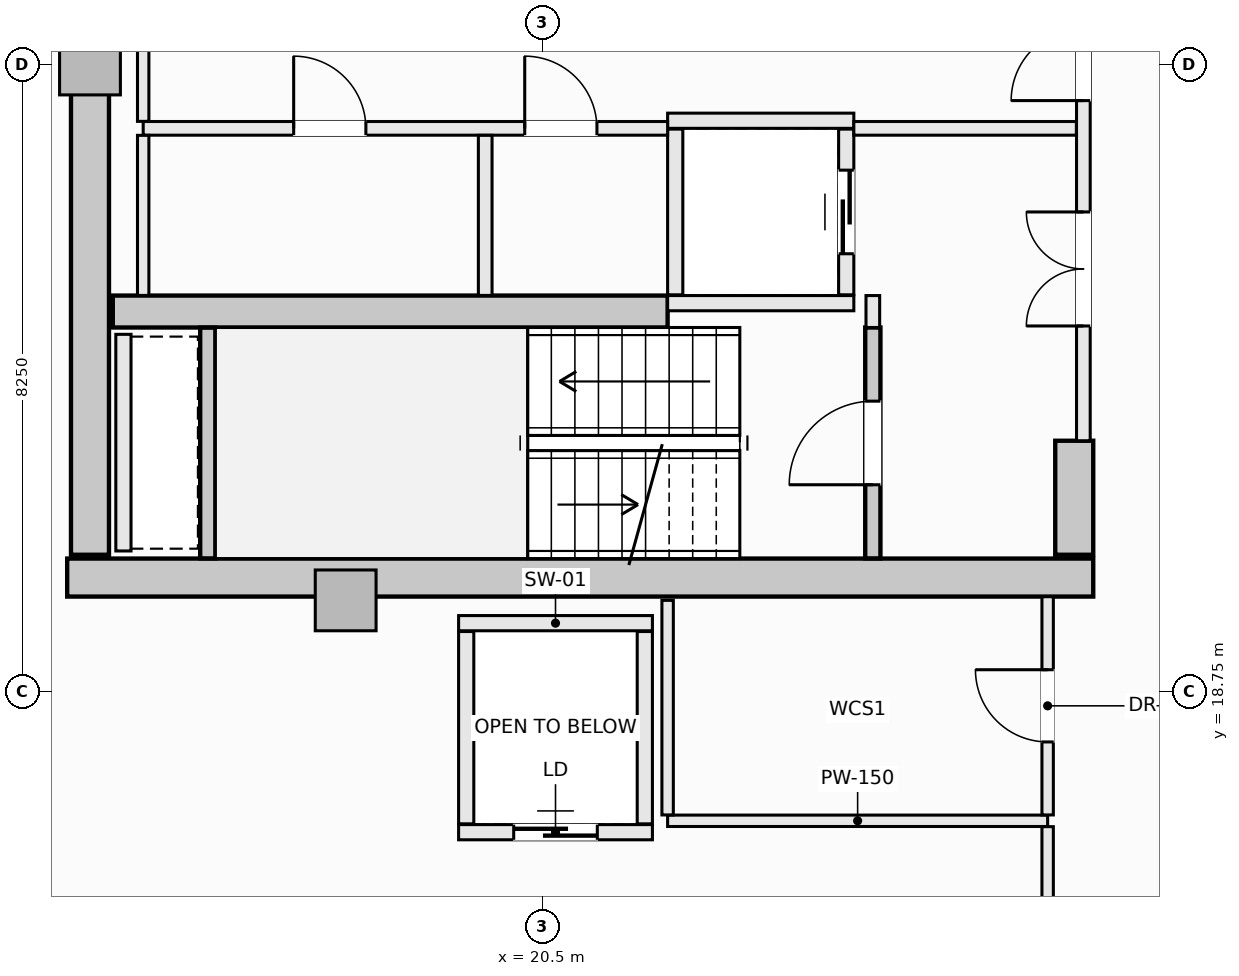
"""IFC4 building model, lengths in metres.
Left out: names, types, materials, properties, quantities, classifications, styles, units other than length and angle.
Written with IfcOpenShell. Run it as: python <this file> out.ifc"""

import sys

from ifc_helpers import new_model, si_unit, direction, frame, frame_2d, origin, origin_2d, place, context, subcontext, project, spatial, rectangle, extrude, element, fill, save


model = new_model("IFC4")
c1 = context("Model", 3, precision=1e-05, world=origin(), true_north=direction((0.0, 1.0)))
c2 = subcontext(c1, "Body", "Model", "MODEL_VIEW")
j1 = project(units=[si_unit("LENGTHUNIT", "METRE"), si_unit("PLANEANGLEUNIT", "RADIAN")], contexts=[c1])
p1 = place(None, origin())
s1 = spatial("IfcSite", under=j1, at=p1, CompositionType="ELEMENT")
p2 = place(p1, origin())
s2 = spatial("IfcBuilding", under=s1, at=p2, CompositionType="ELEMENT")
p3 = place(p2, frame((0.0, 0.0, 196.4)))
s3 = spatial("IfcBuildingStorey", under=s2, at=p3, CompositionType="ELEMENT", Elevation=196.4)
p4 = place(p3, frame((14.25, 20.25, -0.27), z_axis=(0.0, 0.0, 1.0), x_axis=(1.0, 0.0, 0.0)))
e1 = element("IfcWall", 1, at=p4, inside=s3, PredefinedType="SHEAR", context=c2, shape_type="SweptSolid", body=[
    extrude(rectangle(XDim=13.5, YDim=0.5, at=frame_2d((6.75, 0.0))), origin(), (0.0, 0.0, 1.0), 3.3),
])
p5 = place(p3, frame((14.55, 20.55, -0.27), z_axis=(0.0, 0.0, 1.0), x_axis=(0.0, 1.0, 0.0)))
e2 = element("IfcWall", 2, at=p5, inside=s3, PredefinedType="SHEAR", context=c2, shape_type="SweptSolid", body=[
    extrude(rectangle(XDim=12.9, YDim=0.5, at=frame_2d((6.45, 0.0))), origin(), (0.0, 0.0, 1.0), 3.3),
])
p6 = place(p3, frame((27.5, 20.55, -0.27), z_axis=(0.0, 0.0, 1.0), x_axis=(0.0, 1.0, 0.0)))
e3 = element("IfcWall", 3, at=p6, inside=s3, PredefinedType="SHEAR", context=c2, shape_type="SweptSolid", body=[
    extrude(rectangle(XDim=1.5, YDim=0.5, at=frame_2d((0.75, 0.0))), origin(), (0.0, 0.0, 1.0), 3.3),
])
p7 = place(p3, frame((14.85, 23.75, -0.27), z_axis=(0.0, 0.0, 1.0), x_axis=(1.0, 0.0, 0.0)))
e4 = element("IfcWall", 4, at=p7, inside=s3, PredefinedType="SHEAR", context=c2, shape_type="SweptSolid", body=[
    extrude(rectangle(XDim=7.3, YDim=0.42, at=frame_2d((3.65, 0.0))), origin(), (0.0, 0.0, 1.0), 3.3),
])
for number, where, z_axis, x_axis in (
    (5, (14.55, 27.0, -0.27), (0.0, 0.0, 1.0), (1.0, 0.0, 0.0)),
    (6, (17.914, 19.95, -0.27), (0.0, 0.0, 1.0), (1.0, 0.0, 0.0)),
):
    element("IfcColumn", number, at=place(p3, frame(where, z_axis=z_axis, x_axis=x_axis)), inside=s3, PredefinedType="PILASTER", context=c2, shape_type="SweptSolid", body=[
        extrude(rectangle(XDim=0.8, YDim=0.8, at=origin_2d()), origin(), (0.0, 0.0, 1.0), 3.3),
    ])
p8 = place(p3, frame((8.691, 17.1, 0.0), z_axis=(0.0, 0.0, 1.0), x_axis=(0.901348331142, -0.433094892545, 0.0)))
e7 = element("IfcWall", 7, at=p8, inside=s3, PredefinedType="SOLIDWALL", context=c2, shape_type="SweptSolid", body=[
    extrude(rectangle(XDim=6.021, YDim=0.3, at=frame_2d((3.01, 0.0))), origin(), (0.0, 0.0, 1.0), 2.605),
])
p9 = place(p8, frame((1.65, 0.0, 0.72)))
e8 = element("IfcOpeningElement", 8, at=p9, cuts=e7, PredefinedType="OPENING", context=c2, shape_type="SweptSolid", body=[
    extrude(rectangle(XDim=2.2, YDim=1.65, at=frame_2d((1.1, 0.825))), frame((0.0, 0.16, 0.0), z_axis=(0.0, -1.0, 0.0), x_axis=(1.0, 0.0, 0.0)), (0.0, 0.0, 1.0), 0.32),
])
p10 = place(p3, frame((24.85, 20.502, -0.27), z_axis=(0.0, 0.0, 1.0), x_axis=(0.0, 1.0, 0.0)))
e9 = element("IfcWall", 9, at=p10, inside=s3, PredefinedType="SHEAR", context=c2, shape_type="SweptSolid", body=[
    extrude(rectangle(XDim=3.038, YDim=0.2, at=frame_2d((1.519, 0.0))), origin(), (0.0, 0.0, 1.0), 3.3),
])
p11 = place(p10, frame((0.969, 0.0, 0.27)))
e10 = element("IfcOpeningElement", 10, at=p11, cuts=e9, PredefinedType="OPENING", context=c2, shape_type="SweptSolid", body=[
    extrude(rectangle(XDim=1.1, YDim=2.15, at=frame_2d((0.55, 1.075))), frame((0.0, 0.11, 0.0), z_axis=(0.0, -1.0, 0.0), x_axis=(1.0, 0.0, 0.0)), (0.0, 0.0, 1.0), 0.22),
])
p12 = place(p3, frame((16.1, 20.502, -0.27), z_axis=(0.0, 0.0, 1.0), x_axis=(0.0, 1.0, 0.0)))
e11 = element("IfcWall", 11, at=p12, inside=s3, PredefinedType="SHEAR", context=c2, shape_type="SweptSolid", body=[
    extrude(rectangle(XDim=3.036, YDim=0.2, at=frame_2d((1.518, 0.0))), origin(), (0.0, 0.0, 1.0), 3.3),
])
for number, where, z_axis, x_axis in (
    (12, (22.15, 26.26, 0.0), (0.0, 0.0, 1.0), (1.0, 0.0, 0.0)),
    (13, (22.15, 23.86, 0.0), (0.0, 0.0, 1.0), (1.0, 0.0, 0.0)),
):
    element("IfcWall", number, at=place(p3, frame(where, z_axis=z_axis, x_axis=x_axis)), inside=s3, PredefinedType="SOLIDWALL", context=c2, shape_type="SweptSolid", body=[
        extrude(rectangle(XDim=2.45, YDim=0.2, at=frame_2d((1.225, 0.0))), origin(), (0.0, 0.0, 1.0), 3.03),
    ])
p13 = place(p3, frame((22.25, 23.97, 0.0), z_axis=(0.0, 0.0, 1.0), x_axis=(0.0, 1.0, 0.0)))
e14 = element("IfcWall", 14, at=p13, inside=s3, PredefinedType="SOLIDWALL", context=c2, shape_type="SweptSolid", body=[
    extrude(rectangle(XDim=2.18, YDim=0.2, at=frame_2d((1.09, 0.0))), origin(), (0.0, 0.0, 1.0), 3.03),
])
p14 = place(p3, frame((24.5, 23.97, 0.0), z_axis=(0.0, 0.0, 1.0), x_axis=(0.0, 1.0, 0.0)))
e15 = element("IfcWall", 15, at=p14, inside=s3, PredefinedType="SOLIDWALL", context=c2, shape_type="SweptSolid", body=[
    extrude(rectangle(XDim=2.18, YDim=0.2, at=frame_2d((1.09, 0.0))), origin(), (0.0, 0.0, 1.0), 3.03),
])
p15 = place(p14, frame((0.54, 0.0, 0.0)))
e16 = element("IfcOpeningElement", 16, at=p15, cuts=e15, PredefinedType="OPENING", context=c2, shape_type="SweptSolid", body=[
    extrude(rectangle(XDim=1.1, YDim=2.2, at=frame_2d((0.55, 1.1))), frame((0.0, 0.11, 0.0), z_axis=(0.0, -1.0, 0.0), x_axis=(1.0, 0.0, 0.0)), (0.0, 0.0, 1.0), 0.22),
])
p16 = place(p3, frame((19.4, 19.65, 0.0), z_axis=(0.0, 0.0, 1.0), x_axis=(1.0, 0.0, 0.0)))
e17 = element("IfcWall", 17, at=p16, inside=s3, PredefinedType="SOLIDWALL", context=c2, shape_type="SweptSolid", body=[
    extrude(rectangle(XDim=2.55, YDim=0.2, at=frame_2d((1.275, 0.0))), origin(), (0.0, 0.0, 1.0), 3.03),
])
p17 = place(p3, frame((19.4, 16.9, 0.0), z_axis=(0.0, 0.0, 1.0), x_axis=(1.0, 0.0, 0.0)))
e18 = element("IfcWall", 18, at=p17, inside=s3, PredefinedType="SOLIDWALL", context=c2, shape_type="SweptSolid", body=[
    extrude(rectangle(XDim=2.55, YDim=0.2, at=frame_2d((1.275, 0.0))), origin(), (0.0, 0.0, 1.0), 3.03),
])
p18 = place(p17, frame((0.725, 0.0, 0.0)))
e19 = element("IfcOpeningElement", 19, at=p18, cuts=e18, PredefinedType="OPENING", context=c2, shape_type="SweptSolid", body=[
    extrude(rectangle(XDim=1.1, YDim=2.2, at=frame_2d((0.55, 1.1))), frame((0.0, 0.11, 0.0), z_axis=(0.0, -1.0, 0.0), x_axis=(1.0, 0.0, 0.0)), (0.0, 0.0, 1.0), 0.22),
])
for number, where, z_axis, x_axis in (
    (20, (19.5, 17.01, 0.0), (0.0, 0.0, 1.0), (0.0, 1.0, 0.0)),
    (21, (21.85, 17.01, 0.0), (0.0, 0.0, 1.0), (0.0, 1.0, 0.0)),
):
    element("IfcWall", number, at=place(p3, frame(where, z_axis=z_axis, x_axis=x_axis)), inside=s3, PredefinedType="SOLIDWALL", context=c2, shape_type="SweptSolid", body=[
        extrude(rectangle(XDim=2.53, YDim=0.2, at=frame_2d((1.265, 0.0))), origin(), (0.0, 0.0, 1.0), 3.03),
    ])
p19 = place(p3, frame((14.99, 20.6, 0.0), z_axis=(0.0, 0.0, 1.0), x_axis=(0.0, 1.0, 0.0)))
e22 = element("IfcWall", 22, at=p19, inside=s3, PredefinedType="SOLIDWALL", context=c2, shape_type="SweptSolid", body=[
    extrude(rectangle(XDim=2.85, YDim=0.2, at=frame_2d((1.425, 0.0))), origin(), (0.0, 0.0, 1.0), 3.03),
])
p20 = place(p3, frame((24.85, 23.54, 0.0), z_axis=(0.0, 0.0, 1.0), x_axis=(0.0, 1.0, 0.0)))
e23 = element("IfcWall", 23, at=p20, inside=s3, PredefinedType="SOLIDWALL", context=c2, shape_type="SweptSolid", body=[
    extrude(rectangle(XDim=0.42, YDim=0.18, at=frame_2d((0.21, 0.0))), origin(), (0.0, 0.0, 1.0), 3.03),
])
p21 = place(p3, frame((27.62, 22.05, 0.0), z_axis=(0.0, 0.0, 1.0), x_axis=(0.0, 1.0, 0.0)))
e24 = element("IfcWall", 24, at=p21, inside=s3, PredefinedType="SOLIDWALL", context=c2, shape_type="SweptSolid", body=[
    extrude(rectangle(XDim=9.9, YDim=0.18, at=frame_2d((4.95, 0.0))), origin(), (0.0, 0.0, 1.0), 3.03),
])
p22 = place(p21, frame((4.475, 0.0, 0.0)))
e25 = element("IfcOpeningElement", 25, at=p22, cuts=e24, PredefinedType="OPENING", context=c2, shape_type="SweptSolid", body=[
    extrude(rectangle(XDim=0.95, YDim=2.1, at=frame_2d((0.475, 1.05))), frame((0.0, 0.1, 0.0), z_axis=(0.0, -1.0, 0.0), x_axis=(1.0, 0.0, 0.0)), (0.0, 0.0, 1.0), 0.2),
])
p23 = place(p21, frame((6.89, 0.0, 0.0)))
e26 = element("IfcOpeningElement", 26, at=p23, cuts=e24, PredefinedType="OPENING", context=c2, shape_type="SweptSolid", body=[
    extrude(rectangle(XDim=1.5, YDim=2.2, at=frame_2d((0.75, 1.1))), frame((0.0, 0.1, 0.0), z_axis=(0.0, -1.0, 0.0), x_axis=(1.0, 0.0, 0.0)), (0.0, 0.0, 1.0), 0.2),
])
p24 = place(p21, frame((1.51, 0.0, 0.0)))
e27 = element("IfcOpeningElement", 27, at=p24, cuts=e24, PredefinedType="OPENING", context=c2, shape_type="SweptSolid", body=[
    extrude(rectangle(XDim=1.5, YDim=2.2, at=frame_2d((0.75, 1.1))), frame((0.0, 0.1, 0.0), z_axis=(0.0, -1.0, 0.0), x_axis=(1.0, 0.0, 0.0)), (0.0, 0.0, 1.0), 0.2),
])
p25 = place(p3, frame((15.25, 26.16, 0.0), z_axis=(0.0, 0.0, 1.0), x_axis=(1.0, 0.0, 0.0)))
e28 = element("IfcWall", 28, at=p25, inside=s3, PredefinedType="SOLIDWALL", context=c2, shape_type="SweptSolid", body=[
    extrude(rectangle(XDim=6.9, YDim=0.18, at=frame_2d((3.45, 0.0))), origin(), (0.0, 0.0, 1.0), 3.03),
])
p26 = place(p25, frame((5.02, 0.0, 0.0)))
e29 = element("IfcOpeningElement", 29, at=p26, cuts=e28, PredefinedType="OPENING", context=c2, shape_type="SweptSolid", body=[
    extrude(rectangle(XDim=0.95, YDim=2.1, at=frame_2d((0.475, 1.05))), frame((0.0, 0.1, 0.0), z_axis=(0.0, -1.0, 0.0), x_axis=(1.0, 0.0, 0.0)), (0.0, 0.0, 1.0), 0.2),
])
p27 = place(p25, frame((1.98, 0.0, 0.0)))
e30 = element("IfcOpeningElement", 30, at=p27, cuts=e28, PredefinedType="OPENING", context=c2, shape_type="SweptSolid", body=[
    extrude(rectangle(XDim=0.95, YDim=2.1, at=frame_2d((0.475, 1.05))), frame((0.0, 0.1, 0.0), z_axis=(0.0, -1.0, 0.0), x_axis=(1.0, 0.0, 0.0)), (0.0, 0.0, 1.0), 0.2),
])
p28 = place(p3, frame((24.6, 26.16, 0.0), z_axis=(0.0, 0.0, 1.0), x_axis=(1.0, 0.0, 0.0)))
e31 = element("IfcWall", 31, at=p28, inside=s3, PredefinedType="SOLIDWALL", context=c2, shape_type="SweptSolid", body=[
    extrude(rectangle(XDim=2.928, YDim=0.18, at=frame_2d((1.464, 0.0))), origin(), (0.0, 0.0, 1.0), 3.03),
])
p29 = place(p3, frame((15.25, 23.962, 0.0), z_axis=(0.0, 0.0, 1.0), x_axis=(0.0, 1.0, 0.0)))
e32 = element("IfcWall", 32, at=p29, inside=s3, PredefinedType="PARTITIONING", context=c2, shape_type="SweptSolid", body=[
    extrude(rectangle(XDim=2.106, YDim=0.15, at=frame_2d((1.053, 0.0))), origin(), (0.0, 0.0, 1.0), 3.03),
])
p30 = place(p3, frame((15.25, 26.252, 0.0), z_axis=(0.0, 0.0, 1.0), x_axis=(0.0, 1.0, 0.0)))
e33 = element("IfcWall", 33, at=p30, inside=s3, PredefinedType="PARTITIONING", context=c2, shape_type="SweptSolid", body=[
    extrude(rectangle(XDim=1.496, YDim=0.15, at=frame_2d((0.748, 0.0))), origin(), (0.0, 0.0, 1.0), 3.03),
])
p31 = place(p3, frame((19.75, 23.962, 0.0), z_axis=(0.0, 0.0, 1.0), x_axis=(0.0, 1.0, 0.0)))
e34 = element("IfcWall", 34, at=p31, inside=s3, PredefinedType="SOLIDWALL", context=c2, shape_type="SweptSolid", body=[
    extrude(rectangle(XDim=2.106, YDim=0.18, at=frame_2d((1.053, 0.0))), origin(), (0.0, 0.0, 1.0), 3.03),
])
p32 = place(p3, frame((22.15, 17.05, 0.0), z_axis=(0.0, 0.0, 1.0), x_axis=(1.0, 0.0, 0.0)))
e35 = element("IfcWall", 35, at=p32, inside=s3, PredefinedType="PARTITIONING", context=c2, shape_type="SweptSolid", body=[
    extrude(rectangle(XDim=5.0, YDim=0.15, at=frame_2d((2.5, 0.0))), origin(), (0.0, 0.0, 1.0), 3.03),
])
p33 = place(p3, frame((22.15, 17.127, 0.0), z_axis=(0.0, 0.0, 1.0), x_axis=(0.0, 1.0, 0.0)))
e36 = element("IfcWall", 36, at=p33, inside=s3, PredefinedType="PARTITIONING", context=c2, shape_type="SweptSolid", body=[
    extrude(rectangle(XDim=2.823, YDim=0.15, at=frame_2d((1.412, 0.0))), origin(), (0.0, 0.0, 1.0), 3.03),
])
p34 = place(p3, frame((27.15, 11.113, 0.0), z_axis=(0.0, 0.0, 1.0), x_axis=(0.0, 1.0, 0.0)))
e37 = element("IfcWall", 37, at=p34, inside=s3, PredefinedType="PARTITIONING", context=c2, shape_type="SweptSolid", body=[
    extrude(rectangle(XDim=5.86, YDim=0.15, at=frame_2d((2.93, 0.0))), origin(), (0.0, 0.0, 1.0), 3.03),
])
p35 = place(p34, frame((3.808, 0.0, 0.0)))
e38 = element("IfcOpeningElement", 38, at=p35, cuts=e37, PredefinedType="OPENING", context=c2, shape_type="SweptSolid", body=[
    extrude(rectangle(XDim=0.95, YDim=2.1, at=frame_2d((0.475, 1.05))), frame((0.0, 0.085, 0.0), z_axis=(0.0, -1.0, 0.0), x_axis=(1.0, 0.0, 0.0)), (0.0, 0.0, 1.0), 0.17),
])
p36 = place(p34, frame((1.288, 0.0, 0.0)))
e39 = element("IfcOpeningElement", 39, at=p36, cuts=e37, PredefinedType="OPENING", context=c2, shape_type="SweptSolid", body=[
    extrude(rectangle(XDim=0.95, YDim=2.1, at=frame_2d((0.475, 1.05))), frame((0.0, 0.085, 0.0), z_axis=(0.0, -1.0, 0.0), x_axis=(1.0, 0.0, 0.0)), (0.0, 0.0, 1.0), 0.17),
])
p37 = place(p3, frame((27.15, 17.127, 0.0), z_axis=(0.0, 0.0, 1.0), x_axis=(0.0, 1.0, 0.0)))
e40 = element("IfcWall", 40, at=p37, inside=s3, PredefinedType="PARTITIONING", context=c2, shape_type="SweptSolid", body=[
    extrude(rectangle(XDim=2.871, YDim=0.15, at=frame_2d((1.436, 0.0))), origin(), (0.0, 0.0, 1.0), 3.03),
])
p38 = place(p37, frame((0.96, 0.0, 0.0)))
e41 = element("IfcOpeningElement", 41, at=p38, cuts=e40, PredefinedType="OPENING", context=c2, shape_type="SweptSolid", body=[
    extrude(rectangle(XDim=0.95, YDim=2.1, at=frame_2d((0.475, 1.05))), frame((0.0, 0.085, 0.0), z_axis=(0.0, -1.0, 0.0), x_axis=(1.0, 0.0, 0.0)), (0.0, 0.0, 1.0), 0.17),
])
p39 = place(p3, frame((5.866, 24.954, 0.0), z_axis=(0.0, 0.0, 1.0), x_axis=(0.871135339325, 0.491042992597, 0.0)))
e42 = element("IfcWall", 42, at=p39, inside=s3, PredefinedType="PARTITIONING", context=c2, shape_type="SweptSolid", body=[
    extrude(rectangle(XDim=9.68, YDim=0.12, at=frame_2d((4.84, 0.0))), origin(), (0.0, 0.0, 1.0), 2.478),
])
p40 = place(p11, origin())
e43 = element("IfcDoor", 43, at=p40, inside=s3, OperationType="SINGLE_SWING_LEFT", PredefinedType="DOOR", context=c2, shape_type="SweptSolid", body=[
    extrude(rectangle(XDim=1.1, YDim=2.15, at=frame_2d((0.55, 1.075))), frame((0.0, 0.025, 0.0), z_axis=(0.0, -1.0, 0.0), x_axis=(1.0, 0.0, 0.0)), (0.0, 0.0, 1.0), 0.05),
])
fill(e10, e43)
p41 = place(p15, origin())
e44 = element("IfcDoor", 44, at=p41, inside=s3, OperationType="SLIDING_TO_LEFT", PredefinedType="DOOR", context=c2, shape_type="SweptSolid", body=[
    extrude(rectangle(XDim=1.1, YDim=2.2, at=frame_2d((0.55, 1.1))), frame((0.0, 0.025, 0.0), z_axis=(0.0, -1.0, 0.0), x_axis=(1.0, 0.0, 0.0)), (0.0, 0.0, 1.0), 0.05),
])
fill(e16, e44)
p42 = place(p18, origin())
e45 = element("IfcDoor", 45, at=p42, inside=s3, OperationType="SLIDING_TO_LEFT", PredefinedType="DOOR", context=c2, shape_type="SweptSolid", body=[
    extrude(rectangle(XDim=1.1, YDim=2.2, at=frame_2d((0.55, 1.1))), frame((0.0, 0.025, 0.0), z_axis=(0.0, -1.0, 0.0), x_axis=(1.0, 0.0, 0.0)), (0.0, 0.0, 1.0), 0.05),
])
fill(e19, e45)
p43 = place(p22, origin())
e46 = element("IfcDoor", 46, at=p43, inside=s3, OperationType="SINGLE_SWING_LEFT", PredefinedType="DOOR", context=c2, shape_type="SweptSolid", body=[
    extrude(rectangle(XDim=0.95, YDim=2.1, at=frame_2d((0.475, 1.05))), frame((0.0, 0.025, 0.0), z_axis=(0.0, -1.0, 0.0), x_axis=(1.0, 0.0, 0.0)), (0.0, 0.0, 1.0), 0.05),
])
fill(e25, e46)
p44 = place(p24, origin())
e47 = element("IfcDoor", 47, at=p44, inside=s3, OperationType="DOUBLE_DOOR_SINGLE_SWING", PredefinedType="DOOR", context=c2, shape_type="SweptSolid", body=[
    extrude(rectangle(XDim=1.5, YDim=2.2, at=frame_2d((0.75, 1.1))), frame((0.0, 0.025, 0.0), z_axis=(0.0, -1.0, 0.0), x_axis=(1.0, 0.0, 0.0)), (0.0, 0.0, 1.0), 0.05),
])
fill(e27, e47)
p45 = place(p26, origin())
e48 = element("IfcDoor", 48, at=p45, inside=s3, OperationType="SINGLE_SWING_LEFT", PredefinedType="DOOR", context=c2, shape_type="SweptSolid", body=[
    extrude(rectangle(XDim=0.95, YDim=2.1, at=frame_2d((0.475, 1.05))), frame((0.0, 0.025, 0.0), z_axis=(0.0, -1.0, 0.0), x_axis=(1.0, 0.0, 0.0)), (0.0, 0.0, 1.0), 0.05),
])
fill(e29, e48)
p46 = place(p27, origin())
e49 = element("IfcDoor", 49, at=p46, inside=s3, OperationType="SINGLE_SWING_LEFT", PredefinedType="DOOR", context=c2, shape_type="SweptSolid", body=[
    extrude(rectangle(XDim=0.95, YDim=2.1, at=frame_2d((0.475, 1.05))), frame((0.0, 0.025, 0.0), z_axis=(0.0, -1.0, 0.0), x_axis=(1.0, 0.0, 0.0)), (0.0, 0.0, 1.0), 0.05),
])
fill(e30, e49)
p47 = place(p38, origin())
e50 = element("IfcDoor", 50, at=p47, inside=s3, OperationType="SINGLE_SWING_RIGHT", PredefinedType="DOOR", context=c2, shape_type="SweptSolid", body=[
    extrude(rectangle(XDim=0.95, YDim=2.1, at=frame_2d((0.475, 1.05))), frame((0.0, 0.025, 0.0), z_axis=(0.0, -1.0, 0.0), x_axis=(1.0, 0.0, 0.0)), (0.0, 0.0, 1.0), 0.05),
])
fill(e41, e50)
save(model, sys.argv[1])
